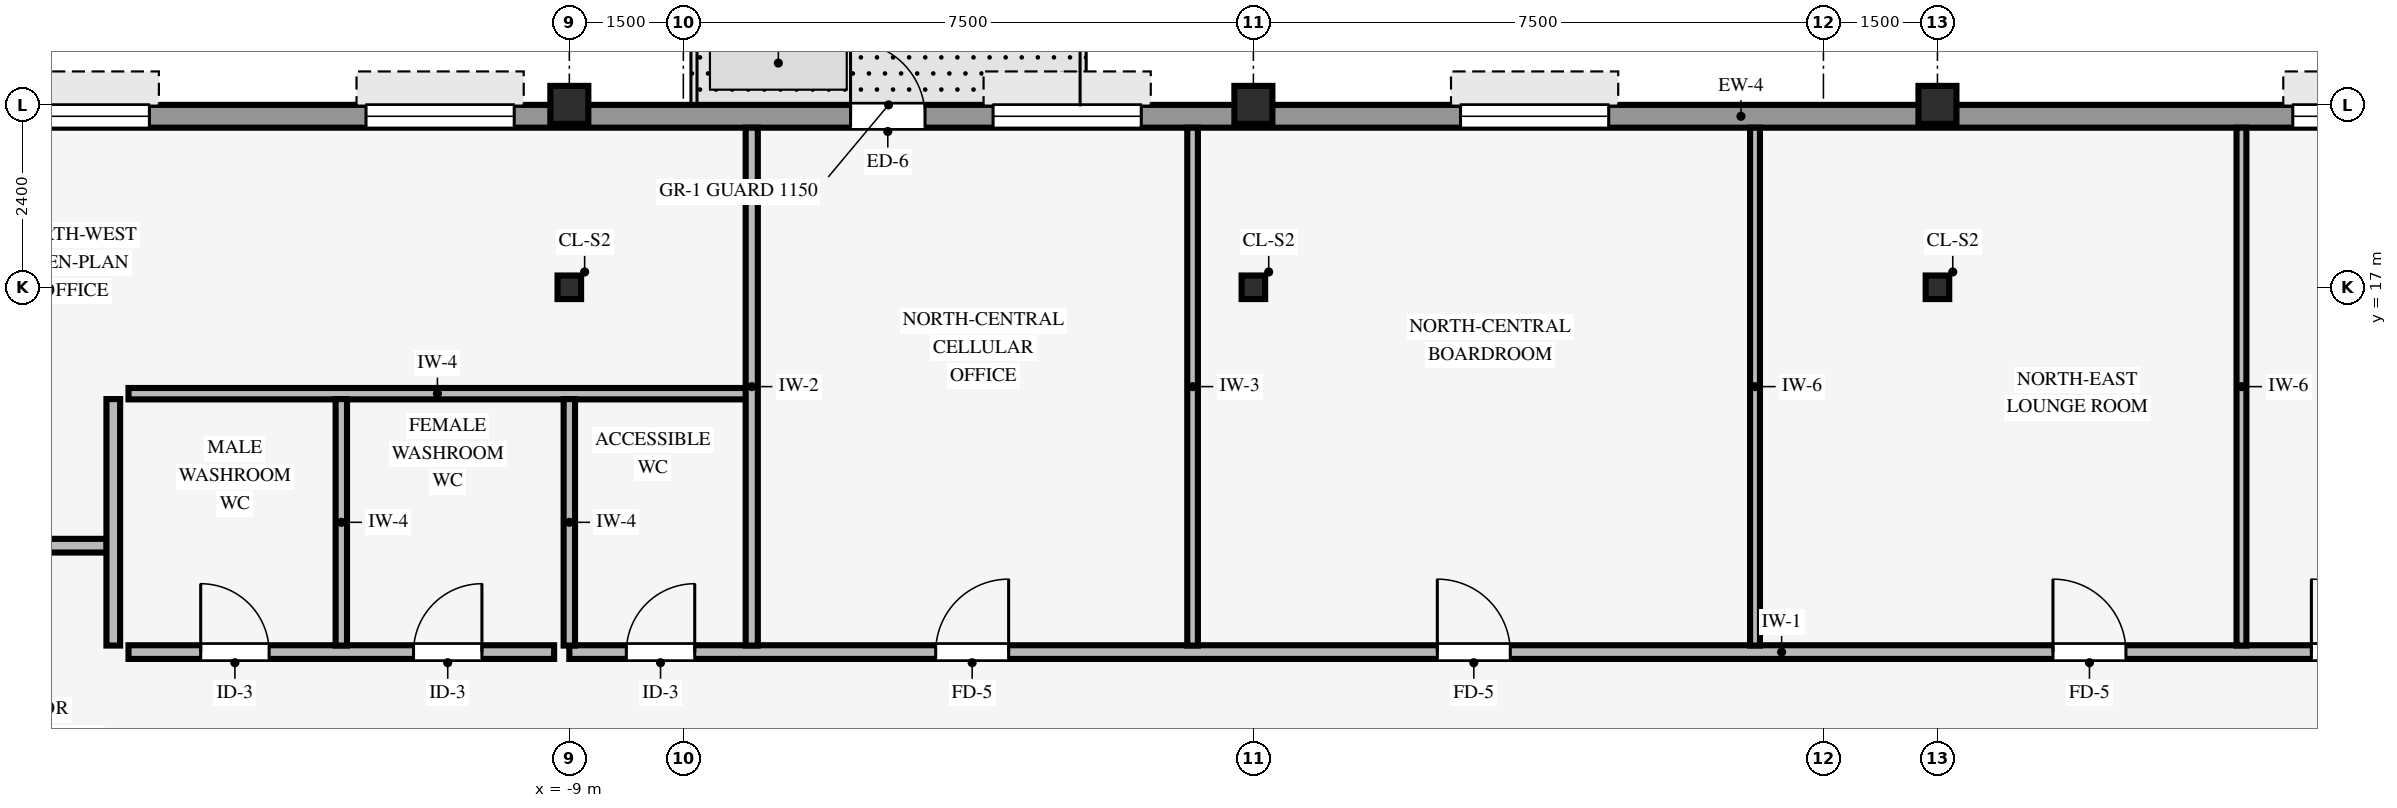
"""IFC4 building model, lengths in metres.
Left out: names, types, materials, properties, quantities, classifications, styles, units other than length and angle.
Written with IfcOpenShell. Run it as: python <this file> out.ifc"""

import sys

from ifc_helpers import new_model, si_unit, direction, frame, frame_2d, origin, origin_2d, place, context, subcontext, project, spatial, rectangle, hollow_rectangle, i_section, extrude, source, transform, mapped, element, fill, save


model = new_model("IFC4")
c1 = context("Model", 3, precision=1e-05, world=origin(), true_north=direction((0.0, 1.0)))
c2 = subcontext(c1, "Body", "Model", "MODEL_VIEW")
j1 = project(units=[si_unit("LENGTHUNIT", "METRE"), si_unit("PLANEANGLEUNIT", "RADIAN")], contexts=[c1])
p1 = place(None, origin())
s1 = spatial("IfcSite", under=j1, at=p1, CompositionType="ELEMENT")
p2 = place(p1, origin())
s2 = spatial("IfcBuilding", under=s1, at=p2, CompositionType="ELEMENT")
p3 = place(p2, frame((0.0, 0.0, 261.6)))
s3 = spatial("IfcBuildingStorey", under=s2, at=p3, CompositionType="ELEMENT", Elevation=261.6)
for number, where, z_axis, x_axis in (
    (1, (-9.0, 19.4, 0.0), (0.0, 0.0, 1.0), (1.0, 0.0, 0.0)),
    (2, (0.0, 19.4, 0.0), (0.0, 0.0, 1.0), (1.0, 0.0, 0.0)),
    (3, (9.0, 19.4, 0.0), (0.0, 0.0, 1.0), (1.0, 0.0, 0.0)),
):
    element("IfcColumn", number, at=place(p3, frame(where, z_axis=z_axis, x_axis=x_axis)), inside=s3, PredefinedType="COLUMN", context=c2, shape_type="SweptSolid", body=[
        extrude(hollow_rectangle(XDim=0.5, YDim=0.5, WallThickness=0.032, InnerFilletRadius=0.032, OuterFilletRadius=0.064, at=origin_2d()), origin(), (0.0, 0.0, 1.0), 3.37),
    ])
for number, where, z_axis, x_axis in (
    (4, (0.0, 17.0, 0.0), (0.0, 0.0, 1.0), (1.0, 0.0, 0.0)),
    (5, (-9.0, 17.0, 0.0), (0.0, 0.0, 1.0), (1.0, 0.0, 0.0)),
    (6, (9.0, 17.0, 0.0), (0.0, 0.0, 1.0), (1.0, 0.0, 0.0)),
):
    element("IfcColumn", number, at=place(p3, frame(where, z_axis=z_axis, x_axis=x_axis)), inside=s3, PredefinedType="COLUMN", context=c2, shape_type="SweptSolid", body=[
        extrude(i_section(OverallWidth=0.31, OverallDepth=0.31, WebThickness=0.015, FlangeThickness=0.015, FilletRadius=0.015, at=origin_2d()), origin(), (0.0, 0.0, 1.0), 3.37),
    ])
p4 = place(p3, frame((-18.9, 19.25, 0.0), z_axis=(0.0, 0.0, 1.0), x_axis=(1.0, 0.0, 0.0)))
e7 = element("IfcWall", 7, at=p4, inside=s3, PredefinedType="STANDARD", context=c2, shape_type="SweptSolid", body=[
    extrude(rectangle(XDim=35.6, YDim=0.3, at=frame_2d((17.8, 0.0))), origin(), (0.0, 0.0, 1.0), 2.705),
])
p5 = place(p4, frame((13.6, 0.0, 0.0)))
e8 = element("IfcOpeningElement", 8, at=p5, cuts=e7, PredefinedType="OPENING", context=c2, shape_type="SweptSolid", body=[
    extrude(rectangle(XDim=0.98, YDim=2.15, at=frame_2d((0.49, 1.075))), frame((0.0, 0.16, 0.0), z_axis=(0.0, -1.0, 0.0), x_axis=(1.0, 0.0, 0.0)), (0.0, 0.0, 1.0), 0.32),
])
p6 = place(p4, frame((2.425, 0.0, 0.8)))
e9 = element("IfcOpeningElement", 9, at=p6, cuts=e7, PredefinedType="OPENING", context=c2, shape_type="SweptSolid", body=[
    extrude(rectangle(XDim=1.95, YDim=1.48, at=frame_2d((0.975, 0.74))), frame((0.0, 0.16, 0.0), z_axis=(0.0, -1.0, 0.0), x_axis=(1.0, 0.0, 0.0)), (0.0, 0.0, 1.0), 0.32),
])
p7 = place(p4, frame((7.225, 0.0, 0.8)))
e10 = element("IfcOpeningElement", 10, at=p7, cuts=e7, PredefinedType="OPENING", context=c2, shape_type="SweptSolid", body=[
    extrude(rectangle(XDim=1.95, YDim=1.48, at=frame_2d((0.975, 0.74))), frame((0.0, 0.16, 0.0), z_axis=(0.0, -1.0, 0.0), x_axis=(1.0, 0.0, 0.0)), (0.0, 0.0, 1.0), 0.32),
])
p8 = place(p4, frame((15.475, 0.0, 0.8)))
e11 = element("IfcOpeningElement", 11, at=p8, cuts=e7, PredefinedType="OPENING", context=c2, shape_type="SweptSolid", body=[
    extrude(rectangle(XDim=1.95, YDim=1.48, at=frame_2d((0.975, 0.74))), frame((0.0, 0.16, 0.0), z_axis=(0.0, -1.0, 0.0), x_axis=(1.0, 0.0, 0.0)), (0.0, 0.0, 1.0), 0.32),
])
p9 = place(p4, frame((21.625, 0.0, 0.8)))
e12 = element("IfcOpeningElement", 12, at=p9, cuts=e7, PredefinedType="OPENING", context=c2, shape_type="SweptSolid", body=[
    extrude(rectangle(XDim=1.95, YDim=1.48, at=frame_2d((0.975, 0.74))), frame((0.0, 0.16, 0.0), z_axis=(0.0, -1.0, 0.0), x_axis=(1.0, 0.0, 0.0)), (0.0, 0.0, 1.0), 0.32),
])
p10 = place(p4, frame((32.575, 0.0, 0.8)))
e13 = element("IfcOpeningElement", 13, at=p10, cuts=e7, PredefinedType="OPENING", context=c2, shape_type="SweptSolid", body=[
    extrude(rectangle(XDim=1.95, YDim=1.48, at=frame_2d((0.975, 0.74))), frame((0.0, 0.16, 0.0), z_axis=(0.0, -1.0, 0.0), x_axis=(1.0, 0.0, 0.0)), (0.0, 0.0, 1.0), 0.32),
])
p11 = place(p3, frame((-14.8, 12.2, 0.0), z_axis=(0.0, 0.0, 1.0), x_axis=(1.0, 0.0, 0.0)))
e14 = element("IfcWall", 14, at=p11, inside=s3, PredefinedType="PARTITIONING", context=c2, shape_type="SweptSolid", body=[
    extrude(rectangle(XDim=5.6, YDim=0.18, at=frame_2d((2.8, 0.0))), origin(), (0.0, 0.0, 1.0), 3.36),
])
p12 = place(p11, frame((0.95, 0.0, 0.0)))
e15 = element("IfcOpeningElement", 15, at=p12, cuts=e14, PredefinedType="OPENING", context=c2, shape_type="SweptSolid", body=[
    extrude(rectangle(XDim=0.9, YDim=2.1, at=frame_2d((0.45, 1.05))), frame((0.0, 0.1, 0.0), z_axis=(0.0, -1.0, 0.0), x_axis=(1.0, 0.0, 0.0)), (0.0, 0.0, 1.0), 0.2),
])
p13 = place(p11, frame((3.75, 0.0, 0.0)))
e16 = element("IfcOpeningElement", 16, at=p13, cuts=e14, PredefinedType="OPENING", context=c2, shape_type="SweptSolid", body=[
    extrude(rectangle(XDim=0.9, YDim=2.1, at=frame_2d((0.45, 1.05))), frame((0.0, 0.1, 0.0), z_axis=(0.0, -1.0, 0.0), x_axis=(1.0, 0.0, 0.0)), (0.0, 0.0, 1.0), 0.2),
])
p14 = place(p3, frame((-9.0, 12.2, 0.0), z_axis=(0.0, 0.0, 1.0), x_axis=(1.0, 0.0, 0.0)))
e17 = element("IfcWall", 17, at=p14, inside=s3, PredefinedType="PARTITIONING", context=c2, shape_type="SweptSolid", body=[
    extrude(rectangle(XDim=24.8, YDim=0.18, at=frame_2d((12.4, 0.0))), origin(), (0.0, 0.0, 1.0), 3.36),
])
p15 = place(p14, frame((11.42, 0.0, 0.0)))
e18 = element("IfcOpeningElement", 18, at=p15, cuts=e17, PredefinedType="OPENING", context=c2, shape_type="SweptSolid", body=[
    extrude(rectangle(XDim=0.96, YDim=2.1, at=frame_2d((0.48, 1.05))), frame((0.0, 0.1, 0.0), z_axis=(0.0, -1.0, 0.0), x_axis=(1.0, 0.0, 0.0)), (0.0, 0.0, 1.0), 0.2),
])
p16 = place(p14, frame((4.82, 0.0, 0.0)))
e19 = element("IfcOpeningElement", 19, at=p16, cuts=e17, PredefinedType="OPENING", context=c2, shape_type="SweptSolid", body=[
    extrude(rectangle(XDim=0.96, YDim=2.1, at=frame_2d((0.48, 1.05))), frame((0.0, 0.1, 0.0), z_axis=(0.0, -1.0, 0.0), x_axis=(1.0, 0.0, 0.0)), (0.0, 0.0, 1.0), 0.2),
])
p17 = place(p14, frame((19.52, 0.0, 0.0)))
e20 = element("IfcOpeningElement", 20, at=p17, cuts=e17, PredefinedType="OPENING", context=c2, shape_type="SweptSolid", body=[
    extrude(rectangle(XDim=0.96, YDim=2.1, at=frame_2d((0.48, 1.05))), frame((0.0, 0.1, 0.0), z_axis=(0.0, -1.0, 0.0), x_axis=(1.0, 0.0, 0.0)), (0.0, 0.0, 1.0), 0.2),
])
p18 = place(p14, frame((22.92, 0.0, 0.0)))
e21 = element("IfcOpeningElement", 21, at=p18, cuts=e17, PredefinedType="OPENING", context=c2, shape_type="SweptSolid", body=[
    extrude(rectangle(XDim=0.96, YDim=2.1, at=frame_2d((0.48, 1.05))), frame((0.0, 0.1, 0.0), z_axis=(0.0, -1.0, 0.0), x_axis=(1.0, 0.0, 0.0)), (0.0, 0.0, 1.0), 0.2),
])
p19 = place(p14, frame((0.75, 0.0, 0.0)))
e22 = element("IfcOpeningElement", 22, at=p19, cuts=e17, PredefinedType="OPENING", context=c2, shape_type="SweptSolid", body=[
    extrude(rectangle(XDim=0.9, YDim=2.1, at=frame_2d((0.45, 1.05))), frame((0.0, 0.1, 0.0), z_axis=(0.0, -1.0, 0.0), x_axis=(1.0, 0.0, 0.0)), (0.0, 0.0, 1.0), 0.2),
])
p20 = place(p3, frame((-20.0, 13.6, 0.0), z_axis=(0.0, 0.0, 1.0), x_axis=(1.0, 0.0, 0.0)))
e23 = element("IfcWall", 23, at=p20, inside=s3, PredefinedType="PARTITIONING", context=c2, shape_type="SweptSolid", body=[
    extrude(rectangle(XDim=4.914, YDim=0.18, at=frame_2d((2.457, 0.0))), origin(), (0.0, 0.0, 1.0), 3.038),
])
p21 = place(p20, frame((1.977, 0.0, 0.0)))
e24 = element("IfcOpeningElement", 24, at=p21, cuts=e23, PredefinedType="OPENING", context=c2, shape_type="SweptSolid", body=[
    extrude(rectangle(XDim=0.96, YDim=2.1, at=frame_2d((0.48, 1.05))), frame((0.0, 0.1, 0.0), z_axis=(0.0, -1.0, 0.0), x_axis=(1.0, 0.0, 0.0)), (0.0, 0.0, 1.0), 0.2),
])
p22 = place(p3, frame((-14.8, 15.6, 0.0), z_axis=(0.0, 0.0, 1.0), x_axis=(1.0, 0.0, 0.0)))
e25 = element("IfcWall", 25, at=p22, inside=s3, PredefinedType="PARTITIONING", context=c2, shape_type="SweptSolid", body=[
    extrude(rectangle(XDim=8.129, YDim=0.15, at=frame_2d((4.064, 0.0))), origin(), (0.0, 0.0, 1.0), 3.36),
])
p23 = place(p3, frame((-15.0, 12.286, 0.0), z_axis=(0.0, 0.0, 1.0), x_axis=(0.0, 1.0, 0.0)))
e26 = element("IfcWall", 26, at=p23, inside=s3, PredefinedType="PARTITIONING", context=c2, shape_type="SweptSolid", body=[
    extrude(rectangle(XDim=3.243, YDim=0.18, at=frame_2d((1.622, 0.0))), origin(), (0.0, 0.0, 1.0), 3.36),
])
p24 = place(p3, frame((-12.0, 12.286, 0.0), z_axis=(0.0, 0.0, 1.0), x_axis=(0.0, 1.0, 0.0)))
e27 = element("IfcWall", 27, at=p24, inside=s3, PredefinedType="PARTITIONING", context=c2, shape_type="SweptSolid", body=[
    extrude(rectangle(XDim=3.243, YDim=0.15, at=frame_2d((1.622, 0.0))), origin(), (0.0, 0.0, 1.0), 3.36),
])
p25 = place(p3, frame((-9.0, 12.286, 0.0), z_axis=(0.0, 0.0, 1.0), x_axis=(0.0, 1.0, 0.0)))
e28 = element("IfcWall", 28, at=p25, inside=s3, PredefinedType="PARTITIONING", context=c2, shape_type="SweptSolid", body=[
    extrude(rectangle(XDim=3.243, YDim=0.15, at=frame_2d((1.622, 0.0))), origin(), (0.0, 0.0, 1.0), 2.892),
])
p26 = place(p3, frame((-6.6, 12.286, 0.0), z_axis=(0.0, 0.0, 1.0), x_axis=(0.0, 1.0, 0.0)))
e29 = element("IfcWall", 29, at=p26, inside=s3, PredefinedType="PARTITIONING", context=c2, shape_type="SweptSolid", body=[
    extrude(rectangle(XDim=6.814, YDim=0.16, at=frame_2d((3.407, 0.0))), origin(), (0.0, 0.0, 1.0), 3.36),
])
p27 = place(p3, frame((-0.8, 12.286, 0.0), z_axis=(0.0, 0.0, 1.0), x_axis=(0.0, 1.0, 0.0)))
e30 = element("IfcWall", 30, at=p27, inside=s3, PredefinedType="PARTITIONING", context=c2, shape_type="SweptSolid", body=[
    extrude(rectangle(XDim=6.814, YDim=0.14, at=frame_2d((3.407, 0.0))), origin(), (0.0, 0.0, 1.0), 3.36),
])
for number, where, z_axis, x_axis in (
    (31, (6.6, 12.286, 0.0), (0.0, 0.0, 1.0), (0.0, 1.0, 0.0)),
    (32, (13.0, 12.286, 0.0), (0.0, 0.0, 1.0), (0.0, 1.0, 0.0)),
):
    element("IfcWall", number, at=place(p3, frame(where, z_axis=z_axis, x_axis=x_axis)), inside=s3, PredefinedType="PARTITIONING", context=c2, shape_type="SweptSolid", body=[
        extrude(rectangle(XDim=6.814, YDim=0.13, at=frame_2d((3.407, 0.0))), origin(), (0.0, 0.0, 1.0), 3.36),
    ])
m1 = source(origin(), c2, "Body", "SweptSolid", [
    extrude(rectangle(XDim=0.98, YDim=2.15, at=frame_2d((0.49, 1.075))), frame((0.0, 0.025, 0.0), z_axis=(0.0, -1.0, 0.0), x_axis=(1.0, 0.0, 0.0)), (0.0, 0.0, 1.0), 0.05),
])
p28 = place(p5, origin())
e33 = element("IfcDoor", 33, at=p28, inside=s3, OperationType="SINGLE_SWING_LEFT", PredefinedType="DOOR", context=c2, shape_type="MappedRepresentation", body=[
    mapped(m1, transform((0.0, 0.0, 0.0), scale=1.0)),
])
fill(e8, e33)
m2 = source(origin(), c2, "Body", "SweptSolid", [
    extrude(rectangle(XDim=1.95, YDim=1.48, at=frame_2d((0.975, 0.74))), frame((0.0, 0.03, 0.0), z_axis=(0.0, -1.0, 0.0), x_axis=(1.0, 0.0, 0.0)), (0.0, 0.0, 1.0), 0.06),
])
p29 = place(p6, origin())
e34 = element("IfcWindow", 34, at=p29, inside=s3, PartitioningType="SINGLE_PANEL", PredefinedType="WINDOW", context=c2, shape_type="MappedRepresentation", body=[
    mapped(m2, transform((0.0, 0.0, 0.0), scale=1.0)),
])
fill(e9, e34)
p30 = place(p7, origin())
e35 = element("IfcWindow", 35, at=p30, inside=s3, PartitioningType="SINGLE_PANEL", PredefinedType="WINDOW", context=c2, shape_type="MappedRepresentation", body=[
    mapped(m2, transform((0.0, 0.0, 0.0), scale=1.0)),
])
fill(e10, e35)
p31 = place(p8, origin())
e36 = element("IfcWindow", 36, at=p31, inside=s3, PartitioningType="SINGLE_PANEL", PredefinedType="WINDOW", context=c2, shape_type="MappedRepresentation", body=[
    mapped(m2, transform((0.0, 0.0, 0.0), scale=1.0)),
])
fill(e11, e36)
p32 = place(p9, origin())
e37 = element("IfcWindow", 37, at=p32, inside=s3, PartitioningType="SINGLE_PANEL", PredefinedType="WINDOW", context=c2, shape_type="MappedRepresentation", body=[
    mapped(m2, transform((0.0, 0.0, 0.0), scale=1.0)),
])
fill(e12, e37)
p33 = place(p10, origin())
e38 = element("IfcWindow", 38, at=p33, inside=s3, PartitioningType="SINGLE_PANEL", PredefinedType="WINDOW", context=c2, shape_type="MappedRepresentation", body=[
    mapped(m2, transform((0.0, 0.0, 0.0), scale=1.0)),
])
fill(e13, e38)
m3 = source(origin(), c2, "Body", "SweptSolid", [
    extrude(rectangle(XDim=0.96, YDim=2.1, at=frame_2d((0.48, 1.05))), frame((0.0, 0.025, 0.0), z_axis=(0.0, -1.0, 0.0), x_axis=(1.0, 0.0, 0.0)), (0.0, 0.0, 1.0), 0.05),
])
p34 = place(p15, origin())
e39 = element("IfcDoor", 39, at=p34, inside=s3, OperationType="SINGLE_SWING_LEFT", PredefinedType="DOOR", context=c2, shape_type="MappedRepresentation", body=[
    mapped(m3, transform((0.0, 0.0, 0.0), scale=1.0)),
])
fill(e18, e39)
p35 = place(p16, origin())
e40 = element("IfcDoor", 40, at=p35, inside=s3, OperationType="SINGLE_SWING_RIGHT", PredefinedType="DOOR", context=c2, shape_type="MappedRepresentation", body=[
    mapped(m3, transform((0.0, 0.0, 0.0), scale=1.0)),
])
fill(e19, e40)
p36 = place(p17, origin())
e41 = element("IfcDoor", 41, at=p36, inside=s3, OperationType="SINGLE_SWING_LEFT", PredefinedType="DOOR", context=c2, shape_type="MappedRepresentation", body=[
    mapped(m3, transform((0.0, 0.0, 0.0), scale=1.0)),
])
fill(e20, e41)
m4 = source(origin(), c2, "Body", "SweptSolid", [
    extrude(rectangle(XDim=0.9, YDim=2.1, at=frame_2d((0.45, 1.05))), frame((0.0, 0.025, 0.0), z_axis=(0.0, -1.0, 0.0), x_axis=(1.0, 0.0, 0.0)), (0.0, 0.0, 1.0), 0.05),
])
p37 = place(p12, origin())
e42 = element("IfcDoor", 42, at=p37, inside=s3, OperationType="SINGLE_SWING_LEFT", PredefinedType="DOOR", context=c2, shape_type="MappedRepresentation", body=[
    mapped(m4, transform((0.0, 0.0, 0.0), scale=1.0)),
])
fill(e15, e42)
p38 = place(p13, origin())
e43 = element("IfcDoor", 43, at=p38, inside=s3, OperationType="SINGLE_SWING_RIGHT", PredefinedType="DOOR", context=c2, shape_type="MappedRepresentation", body=[
    mapped(m4, transform((0.0, 0.0, 0.0), scale=1.0)),
])
fill(e16, e43)
p39 = place(p18, origin())
e44 = element("IfcDoor", 44, at=p39, inside=s3, OperationType="SINGLE_SWING_LEFT", PredefinedType="DOOR", context=c2, shape_type="MappedRepresentation", body=[
    mapped(m3, transform((0.0, 0.0, 0.0), scale=1.0)),
])
fill(e21, e44)
p40 = place(p19, origin())
e45 = element("IfcDoor", 45, at=p40, inside=s3, OperationType="SINGLE_SWING_RIGHT", PredefinedType="DOOR", context=c2, shape_type="MappedRepresentation", body=[
    mapped(m4, transform((0.0, 0.0, 0.0), scale=1.0)),
])
fill(e22, e45)
save(model, sys.argv[1])
